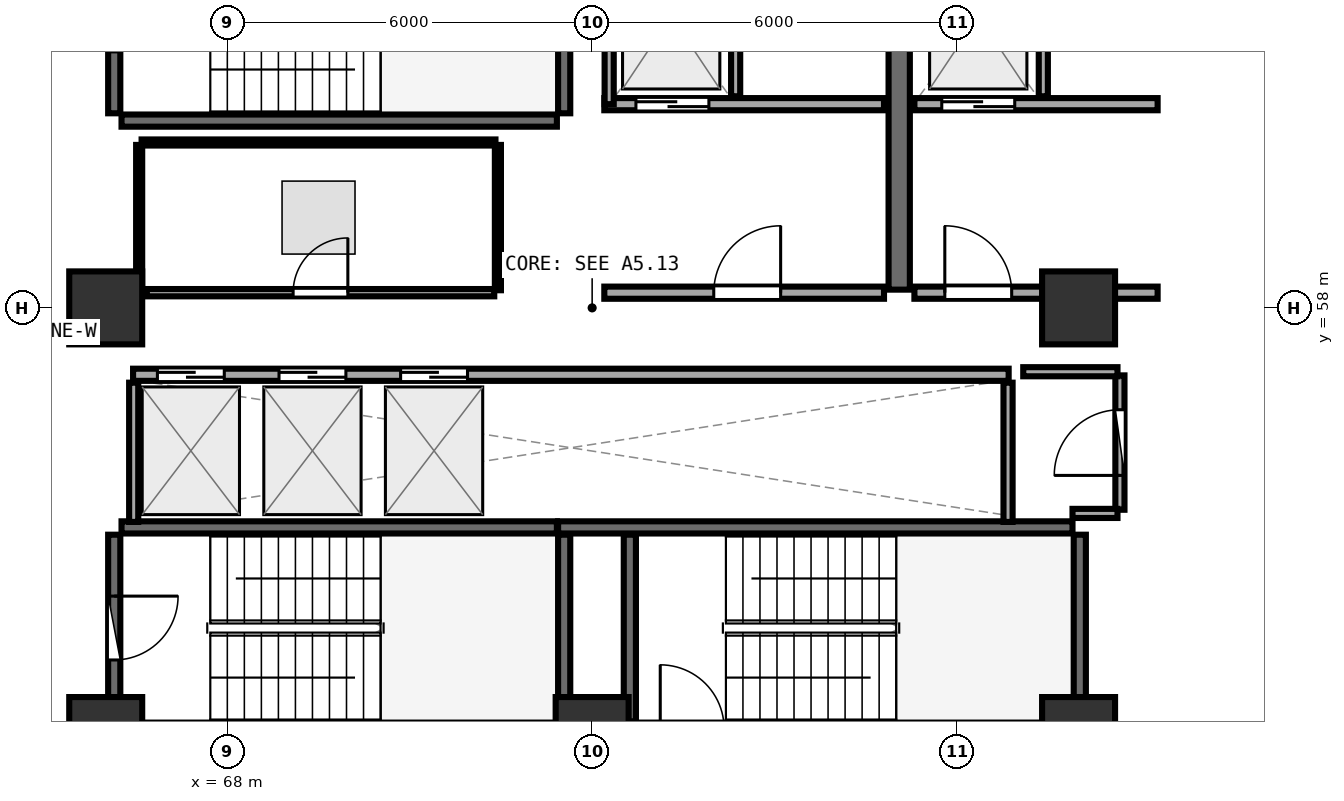
"""IFC4 building model, lengths in metres.
Left out: names, types, materials, properties, quantities, classifications, styles, units other than length and angle.
Written with IfcOpenShell. Run it as: python <this file> out.ifc"""

import sys

from ifc_helpers import new_model, si_unit, direction, frame, frame_2d, origin, origin_2d, place, context, subcontext, project, spatial, rectangle, extrude, element, fill, save


model = new_model("IFC4")
c1 = context("Model", 3, precision=1e-05, world=origin(), true_north=direction((0.0, 1.0)))
c2 = subcontext(c1, "Body", "Model", "MODEL_VIEW")
j1 = project(units=[si_unit("LENGTHUNIT", "METRE"), si_unit("PLANEANGLEUNIT", "RADIAN")], contexts=[c1])
p1 = place(None, origin())
s1 = spatial("IfcSite", under=j1, at=p1, CompositionType="ELEMENT")
p2 = place(p1, origin())
s2 = spatial("IfcBuilding", under=s1, at=p2, CompositionType="ELEMENT")
p3 = place(p2, frame((0.0, 0.0, 208.2)))
s3 = spatial("IfcBuildingStorey", under=s2, at=p3, CompositionType="ELEMENT", Elevation=208.2)
for number, where, z_axis, x_axis in (
    (1, (66.0, 51.0, 0.0), (0.0, 0.0, 1.0), (1.0, 0.0, 0.0)),
    (2, (74.0, 51.0, 0.0), (0.0, 0.0, 1.0), (1.0, 0.0, 0.0)),
    (3, (82.0, 51.0, 0.0), (0.0, 0.0, 1.0), (1.0, 0.0, 0.0)),
    (4, (82.0, 58.0, 0.0), (0.0, 0.0, 1.0), (1.0, 0.0, 0.0)),
    (5, (66.0, 58.0, 0.0), (0.0, 0.0, 1.0), (1.0, 0.0, 0.0)),
):
    element("IfcColumn", number, at=place(p3, frame(where, z_axis=z_axis, x_axis=x_axis)), inside=s3, PredefinedType="PILASTER", context=c2, shape_type="SweptSolid", body=[
        extrude(rectangle(XDim=1.2, YDim=1.2, at=origin_2d()), origin(), (0.0, 0.0, 1.0), 3.75),
    ])
p4 = place(p3, frame((66.26, 61.08, 0.0), z_axis=(0.0, 0.0, 1.0), x_axis=(1.0, 0.0, 0.0)))
e6 = element("IfcWall", 6, at=p4, inside=s3, PredefinedType="SHEAR", context=c2, shape_type="SweptSolid", body=[
    extrude(rectangle(XDim=7.16, YDim=0.2, at=frame_2d((3.58, 0.0))), origin(), (0.0, 0.0, 1.0), 3.49),
])
p5 = place(p3, frame((73.54, 61.2, 0.0), z_axis=(0.0, 0.0, 1.0), x_axis=(0.0, 1.0, 0.0)))
e7 = element("IfcWall", 7, at=p5, inside=s3, PredefinedType="SHEAR", context=c2, shape_type="SweptSolid", body=[
    extrude(rectangle(XDim=3.07, YDim=0.2, at=frame_2d((1.535, 0.0))), origin(), (0.0, 0.0, 1.0), 3.49),
])
p6 = place(p3, frame((66.14, 64.27, 0.0), z_axis=(0.0, 0.0, 1.0), x_axis=(0.0, -1.0, 0.0)))
e8 = element("IfcWall", 8, at=p6, inside=s3, PredefinedType="SHEAR", context=c2, shape_type="SweptSolid", body=[
    extrude(rectangle(XDim=3.07, YDim=0.2, at=frame_2d((1.535, 0.0))), origin(), (0.0, 0.0, 1.0), 3.49),
])
p7 = place(p6, frame((1.01, 0.0, 0.0)))
e9 = element("IfcOpeningElement", 9, at=p7, cuts=e8, PredefinedType="OPENING", context=c2, shape_type="SweptSolid", body=[
    extrude(rectangle(XDim=1.05, YDim=2.1, at=frame_2d((0.525, 1.05))), frame((0.0, 0.11, 0.0), z_axis=(0.0, -1.0, 0.0), x_axis=(1.0, 0.0, 0.0)), (0.0, 0.0, 1.0), 0.22),
])
p8 = place(p3, frame((82.02, 51.2, 0.0), z_axis=(0.0, 0.0, 1.0), x_axis=(0.0, 1.0, 0.0)))
e10 = element("IfcWall", 10, at=p8, inside=s3, PredefinedType="SHEAR", context=c2, shape_type="SweptSolid", body=[
    extrude(rectangle(XDim=3.07, YDim=0.2, at=frame_2d((1.535, 0.0))), origin(), (0.0, 0.0, 1.0), 3.49),
])
p9 = place(p3, frame((81.9, 54.39, 0.0), z_axis=(0.0, 0.0, 1.0), x_axis=(-1.0, 0.0, 0.0)))
e11 = element("IfcWall", 11, at=p9, inside=s3, PredefinedType="SHEAR", context=c2, shape_type="SweptSolid", body=[
    extrude(rectangle(XDim=8.46, YDim=0.2, at=frame_2d((4.23, 0.0))), origin(), (0.0, 0.0, 1.0), 3.49),
])
for number, where, z_axis, x_axis in (
    (12, (74.62, 54.27, 0.0), (0.0, 0.0, 1.0), (0.0, -1.0, 0.0)),
    (13, (73.54, 51.2, 0.0), (0.0, 0.0, 1.0), (0.0, 1.0, 0.0)),
):
    element("IfcWall", number, at=place(p3, frame(where, z_axis=z_axis, x_axis=x_axis)), inside=s3, PredefinedType="SHEAR", context=c2, shape_type="SweptSolid", body=[
        extrude(rectangle(XDim=3.07, YDim=0.2, at=frame_2d((1.535, 0.0))), origin(), (0.0, 0.0, 1.0), 3.49),
    ])
p10 = place(p3, frame((73.42, 54.39, 0.0), z_axis=(0.0, 0.0, 1.0), x_axis=(-1.0, 0.0, 0.0)))
e14 = element("IfcWall", 14, at=p10, inside=s3, PredefinedType="SHEAR", context=c2, shape_type="SweptSolid", body=[
    extrude(rectangle(XDim=7.16, YDim=0.2, at=frame_2d((3.58, 0.0))), origin(), (0.0, 0.0, 1.0), 3.49),
])
p11 = place(p3, frame((66.14, 54.27, 0.0), z_axis=(0.0, 0.0, 1.0), x_axis=(0.0, -1.0, 0.0)))
e15 = element("IfcWall", 15, at=p11, inside=s3, PredefinedType="SHEAR", context=c2, shape_type="SweptSolid", body=[
    extrude(rectangle(XDim=3.07, YDim=0.2, at=frame_2d((1.535, 0.0))), origin(), (0.0, 0.0, 1.0), 3.49),
])
p12 = place(p11, frame((1.01, 0.0, 0.0)))
e16 = element("IfcOpeningElement", 16, at=p12, cuts=e15, PredefinedType="OPENING", context=c2, shape_type="SweptSolid", body=[
    extrude(rectangle(XDim=1.05, YDim=2.1, at=frame_2d((0.525, 1.05))), frame((0.0, 0.11, 0.0), z_axis=(0.0, -1.0, 0.0), x_axis=(1.0, 0.0, 0.0)), (0.0, 0.0, 1.0), 0.22),
])
p13 = place(p3, frame((79.05, 58.3, 0.0), z_axis=(0.0, 0.0, 1.0), x_axis=(0.0, 1.0, 0.0)))
e17 = element("IfcWall", 17, at=p13, inside=s3, PredefinedType="SHEAR", context=c2, shape_type="SweptSolid", body=[
    extrude(rectangle(XDim=6.3, YDim=0.35, at=frame_2d((3.15, 0.0))), origin(), (0.0, 0.0, 1.0), 3.49),
])
p14 = place(p3, frame((74.2, 61.35, 0.0), z_axis=(0.0, 0.0, 1.0), x_axis=(1.0, 0.0, 0.0)))
e18 = element("IfcWall", 18, at=p14, inside=s3, PredefinedType="SOLIDWALL", context=c2, shape_type="SweptSolid", body=[
    extrude(rectangle(XDim=4.6, YDim=0.2, at=frame_2d((2.3, 0.0))), origin(), (0.0, 0.0, 1.0), 3.48),
])
p15 = place(p14, frame((0.52, 0.0, 0.0)))
e19 = element("IfcOpeningElement", 19, at=p15, cuts=e18, PredefinedType="OPENING", context=c2, shape_type="SweptSolid", body=[
    extrude(rectangle(XDim=1.2, YDim=2.15, at=frame_2d((0.6, 1.075))), frame((0.0, 0.11, 0.0), z_axis=(0.0, -1.0, 0.0), x_axis=(1.0, 0.0, 0.0)), (0.0, 0.0, 1.0), 0.22),
])
p16 = place(p3, frame((74.28, 61.35, 0.0), z_axis=(0.0, 0.0, 1.0), x_axis=(0.0, 1.0, 0.0)))
e20 = element("IfcWall", 20, at=p16, inside=s3, PredefinedType="PARTITIONING", context=c2, shape_type="SweptSolid", body=[
    extrude(rectangle(XDim=2.97, YDim=0.15, at=frame_2d((1.485, 0.0))), origin(), (0.0, 0.0, 1.0), 3.48),
])
p17 = place(p3, frame((76.36, 61.48, 0.0), z_axis=(0.0, 0.0, 1.0), x_axis=(0.0, 1.0, 0.0)))
e21 = element("IfcWall", 21, at=p17, inside=s3, PredefinedType="PARTITIONING", context=c2, shape_type="SweptSolid", body=[
    extrude(rectangle(XDim=2.84, YDim=0.15, at=frame_2d((1.42, 0.0))), origin(), (0.0, 0.0, 1.0), 3.48),
])
p18 = place(p3, frame((79.3, 61.35, 0.0), z_axis=(0.0, 0.0, 1.0), x_axis=(1.0, 0.0, 0.0)))
e22 = element("IfcWall", 22, at=p18, inside=s3, PredefinedType="SOLIDWALL", context=c2, shape_type="SweptSolid", body=[
    extrude(rectangle(XDim=4.0, YDim=0.2, at=frame_2d((2.0, 0.0))), origin(), (0.0, 0.0, 1.0), 2.775),
])
p19 = place(p18, frame((0.45, 0.0, 0.0)))
e23 = element("IfcOpeningElement", 23, at=p19, cuts=e22, PredefinedType="OPENING", context=c2, shape_type="SweptSolid", body=[
    extrude(rectangle(XDim=1.2, YDim=2.15, at=frame_2d((0.6, 1.075))), frame((0.0, 0.11, 0.0), z_axis=(0.0, -1.0, 0.0), x_axis=(1.0, 0.0, 0.0)), (0.0, 0.0, 1.0), 0.22),
])
p20 = place(p3, frame((81.42, 61.48, 0.0), z_axis=(0.0, 0.0, 1.0), x_axis=(0.0, 1.0, 0.0)))
e24 = element("IfcWall", 24, at=p20, inside=s3, PredefinedType="PARTITIONING", context=c2, shape_type="SweptSolid", body=[
    extrude(rectangle(XDim=2.84, YDim=0.15, at=frame_2d((1.42, 0.0))), origin(), (0.0, 0.0, 1.0), 3.48),
])
p21 = place(p3, frame((74.2, 58.25, 0.0), z_axis=(0.0, 0.0, 1.0), x_axis=(1.0, 0.0, 0.0)))
e25 = element("IfcWall", 25, at=p21, inside=s3, PredefinedType="SOLIDWALL", context=c2, shape_type="SweptSolid", body=[
    extrude(rectangle(XDim=4.6, YDim=0.2, at=frame_2d((2.3, 0.0))), origin(), (0.0, 0.0, 1.0), 3.48),
])
p22 = place(p21, frame((1.8, 0.0, 0.0)))
e26 = element("IfcOpeningElement", 26, at=p22, cuts=e25, PredefinedType="OPENING", context=c2, shape_type="SweptSolid", body=[
    extrude(rectangle(XDim=1.1, YDim=2.1, at=frame_2d((0.55, 1.05))), frame((0.0, 0.11, 0.0), z_axis=(0.0, -1.0, 0.0), x_axis=(1.0, 0.0, 0.0)), (0.0, 0.0, 1.0), 0.22),
])
p23 = place(p3, frame((79.3, 58.25, 0.0), z_axis=(0.0, 0.0, 1.0), x_axis=(1.0, 0.0, 0.0)))
e27 = element("IfcWall", 27, at=p23, inside=s3, PredefinedType="SOLIDWALL", context=c2, shape_type="SweptSolid", body=[
    extrude(rectangle(XDim=4.0, YDim=0.2, at=frame_2d((2.0, 0.0))), origin(), (0.0, 0.0, 1.0), 2.775),
])
p24 = place(p23, frame((0.5, 0.0, 0.0)))
e28 = element("IfcOpeningElement", 28, at=p24, cuts=e27, PredefinedType="OPENING", context=c2, shape_type="SweptSolid", body=[
    extrude(rectangle(XDim=1.1, YDim=2.1, at=frame_2d((0.55, 1.05))), frame((0.0, 0.11, 0.0), z_axis=(0.0, -1.0, 0.0), x_axis=(1.0, 0.0, 0.0)), (0.0, 0.0, 1.0), 0.22),
])
p25 = place(p3, frame((66.45, 56.9, 0.0), z_axis=(0.0, 0.0, 1.0), x_axis=(1.0, 0.0, 0.0)))
e29 = element("IfcWall", 29, at=p25, inside=s3, PredefinedType="SOLIDWALL", context=c2, shape_type="SweptSolid", body=[
    extrude(rectangle(XDim=14.4, YDim=0.2, at=frame_2d((7.2, 0.0))), origin(), (0.0, 0.0, 1.0), 3.48),
])
p26 = place(p25, frame((0.4, 0.0, 0.0)))
e30 = element("IfcOpeningElement", 30, at=p26, cuts=e29, PredefinedType="OPENING", context=c2, shape_type="SweptSolid", body=[
    extrude(rectangle(XDim=1.1, YDim=2.1, at=frame_2d((0.55, 1.05))), frame((0.0, 0.11, 0.0), z_axis=(0.0, -1.0, 0.0), x_axis=(1.0, 0.0, 0.0)), (0.0, 0.0, 1.0), 0.22),
])
p27 = place(p25, frame((2.4, 0.0, 0.0)))
e31 = element("IfcOpeningElement", 31, at=p27, cuts=e29, PredefinedType="OPENING", context=c2, shape_type="SweptSolid", body=[
    extrude(rectangle(XDim=1.1, YDim=2.1, at=frame_2d((0.55, 1.05))), frame((0.0, 0.11, 0.0), z_axis=(0.0, -1.0, 0.0), x_axis=(1.0, 0.0, 0.0)), (0.0, 0.0, 1.0), 0.22),
])
p28 = place(p25, frame((4.4, 0.0, 0.0)))
e32 = element("IfcOpeningElement", 32, at=p28, cuts=e29, PredefinedType="OPENING", context=c2, shape_type="SweptSolid", body=[
    extrude(rectangle(XDim=1.1, YDim=2.1, at=frame_2d((0.55, 1.05))), frame((0.0, 0.11, 0.0), z_axis=(0.0, -1.0, 0.0), x_axis=(1.0, 0.0, 0.0)), (0.0, 0.0, 1.0), 0.22),
])
for number, where, z_axis, x_axis in (
    (33, (66.46, 54.48, 0.0), (0.0, 0.0, 1.0), (0.0, 1.0, 0.0)),
    (34, (80.84, 54.48, 0.0), (0.0, 0.0, 1.0), (0.0, 1.0, 0.0)),
):
    element("IfcWall", number, at=place(p3, frame(where, z_axis=z_axis, x_axis=x_axis)), inside=s3, PredefinedType="PARTITIONING", context=c2, shape_type="SweptSolid", body=[
        extrude(rectangle(XDim=2.29, YDim=0.15, at=frame_2d((1.145, 0.0))), origin(), (0.0, 0.0, 1.0), 3.48),
    ])
p29 = place(p3, frame((82.68, 54.68, 0.0), z_axis=(0.0, 0.0, 1.0), x_axis=(0.0, 1.0, 0.0)))
e35 = element("IfcWall", 35, at=p29, inside=s3, PredefinedType="PARTITIONING", context=c2, shape_type="SweptSolid", body=[
    extrude(rectangle(XDim=2.21, YDim=0.15, at=frame_2d((1.105, 0.0))), origin(), (0.0, 0.0, 1.0), 3.48),
])
p30 = place(p29, frame((0.565, 0.0, 0.0)))
e36 = element("IfcOpeningElement", 36, at=p30, cuts=e35, PredefinedType="OPENING", context=c2, shape_type="SweptSolid", body=[
    extrude(rectangle(XDim=1.08, YDim=2.1, at=frame_2d((0.54, 1.05))), frame((0.0, 0.085, 0.0), z_axis=(0.0, -1.0, 0.0), x_axis=(1.0, 0.0, 0.0)), (0.0, 0.0, 1.0), 0.17),
])
p31 = place(p3, frame((66.675, 58.25, 0.0), z_axis=(0.0, 0.0, 1.0), x_axis=(1.0, 0.0, 0.0)))
e37 = element("IfcWall", 37, at=p31, inside=s3, PredefinedType="PARTITIONING", context=c2, shape_type="SweptSolid", body=[
    extrude(rectangle(XDim=5.715, YDim=0.12, at=frame_2d((2.857, 0.0))), origin(), (0.0, 0.0, 1.0), 3.48),
])
p32 = place(p31, frame((2.407, 0.0, 0.0)))
e38 = element("IfcOpeningElement", 38, at=p32, cuts=e37, PredefinedType="OPENING", context=c2, shape_type="SweptSolid", body=[
    extrude(rectangle(XDim=0.9, YDim=2.08, at=frame_2d((0.45, 1.04))), frame((0.0, 0.07, 0.0), z_axis=(0.0, -1.0, 0.0), x_axis=(1.0, 0.0, 0.0)), (0.0, 0.0, 1.0), 0.14),
])
p33 = place(p3, frame((81.9, 54.62, 0.0), z_axis=(0.0, 0.0, 1.0), x_axis=(1.0, 0.0, 0.0)))
e39 = element("IfcWall", 39, at=p33, inside=s3, PredefinedType="PARTITIONING", context=c2, shape_type="SweptSolid", body=[
    extrude(rectangle(XDim=0.74, YDim=0.15, at=frame_2d((0.37, 0.0))), origin(), (0.0, 0.0, 1.0), 2.775),
])
p34 = place(p3, frame((82.64, 56.95, 0.0), z_axis=(0.0, 0.0, 1.0), x_axis=(-1.0, 0.0, 0.0)))
e40 = element("IfcWall", 40, at=p34, inside=s3, PredefinedType="PARTITIONING", context=c2, shape_type="SweptSolid", body=[
    extrude(rectangle(XDim=1.55, YDim=0.15, at=frame_2d((0.775, 0.0))), origin(), (0.0, 0.0, 1.0), 2.775),
])
p35 = place(p3, frame((72.45, 58.29, 0.0), z_axis=(0.0, 0.0, 1.0), x_axis=(0.0, 1.0, 0.0)))
e41 = element("IfcWall", 41, at=p35, inside=s3, PredefinedType="PARTITIONING", context=c2, shape_type="SweptSolid", body=[
    extrude(rectangle(XDim=2.39, YDim=0.1, at=frame_2d((1.195, 0.0))), origin(), (0.0, 0.0, 1.0), 3.48),
])
p36 = place(p3, frame((72.41, 60.72, 0.0), z_axis=(0.0, 0.0, 1.0), x_axis=(-1.0, 0.0, 0.0)))
e42 = element("IfcWall", 42, at=p36, inside=s3, PredefinedType="PARTITIONING", context=c2, shape_type="SweptSolid", body=[
    extrude(rectangle(XDim=5.82, YDim=0.1, at=frame_2d((2.91, 0.0))), origin(), (0.0, 0.0, 1.0), 3.48),
])
p37 = place(p3, frame((66.55, 60.68, 0.0), z_axis=(0.0, 0.0, 1.0), x_axis=(0.0, -1.0, 0.0)))
e43 = element("IfcWall", 43, at=p37, inside=s3, PredefinedType="PARTITIONING", context=c2, shape_type="SweptSolid", body=[
    extrude(rectangle(XDim=2.383, YDim=0.1, at=frame_2d((1.191, 0.0))), origin(), (0.0, 0.0, 1.0), 3.48),
])
p38 = place(p3, frame((82.588, 48.389, 0.0), z_axis=(0.0, 0.0, 1.0), x_axis=(0.68157475052, 0.731748494671, 0.0)))
e44 = element("IfcWall", 44, at=p38, inside=s3, PredefinedType="PARTITIONING", context=c2, shape_type="SweptSolid", body=[
    extrude(rectangle(XDim=5.08, YDim=0.1, at=frame_2d((2.54, 0.0))), origin(), (0.0, 0.0, 1.0), 3.025),
])
p39 = place(p3, frame((87.468, 60.334, 0.0), z_axis=(0.0, 0.0, 1.0), x_axis=(-0.534944175276, 0.844887406308, 0.0)))
e45 = element("IfcWall", 45, at=p39, inside=s3, PredefinedType="PARTITIONING", context=c2, shape_type="SweptSolid", body=[
    extrude(rectangle(XDim=8.128, YDim=0.1, at=frame_2d((4.064, 0.0))), origin(), (0.0, 0.0, 1.0), 3.025),
])
p40 = place(p12, origin())
e46 = element("IfcDoor", 46, at=p40, inside=s3, OperationType="SINGLE_SWING_LEFT", PredefinedType="DOOR", context=c2, shape_type="SweptSolid", body=[
    extrude(rectangle(XDim=1.05, YDim=2.1, at=frame_2d((0.525, 1.05))), frame((0.0, 0.025, 0.0), z_axis=(0.0, -1.0, 0.0), x_axis=(1.0, 0.0, 0.0)), (0.0, 0.0, 1.0), 0.05),
])
fill(e16, e46)
p41 = place(p15, origin())
e47 = element("IfcDoor", 47, at=p41, inside=s3, OperationType="DOUBLE_DOOR_SLIDING", PredefinedType="DOOR", context=c2, shape_type="SweptSolid", body=[
    extrude(rectangle(XDim=1.2, YDim=2.15, at=frame_2d((0.6, 1.075))), frame((0.0, 0.025, 0.0), z_axis=(0.0, -1.0, 0.0), x_axis=(1.0, 0.0, 0.0)), (0.0, 0.0, 1.0), 0.05),
])
fill(e19, e47)
p42 = place(p19, origin())
e48 = element("IfcDoor", 48, at=p42, inside=s3, OperationType="DOUBLE_DOOR_SLIDING", PredefinedType="DOOR", context=c2, shape_type="SweptSolid", body=[
    extrude(rectangle(XDim=1.2, YDim=2.15, at=frame_2d((0.6, 1.075))), frame((0.0, 0.025, 0.0), z_axis=(0.0, -1.0, 0.0), x_axis=(1.0, 0.0, 0.0)), (0.0, 0.0, 1.0), 0.05),
])
fill(e23, e48)
p43 = place(p22, frame((1.1, 0.0, 0.0), z_axis=(0.0, 0.0, 1.0), x_axis=(-1.0, 0.0, 0.0)))
e49 = element("IfcDoor", 49, at=p43, inside=s3, OperationType="SINGLE_SWING_LEFT", PredefinedType="DOOR", context=c2, shape_type="SweptSolid", body=[
    extrude(rectangle(XDim=1.1, YDim=2.1, at=frame_2d((0.55, 1.05))), frame((0.0, 0.025, 0.0), z_axis=(0.0, -1.0, 0.0), x_axis=(1.0, 0.0, 0.0)), (0.0, 0.0, 1.0), 0.05),
])
fill(e26, e49)
p44 = place(p24, frame((1.1, 0.0, 0.0), z_axis=(0.0, 0.0, 1.0), x_axis=(-1.0, 0.0, 0.0)))
e50 = element("IfcDoor", 50, at=p44, inside=s3, OperationType="SINGLE_SWING_RIGHT", PredefinedType="DOOR", context=c2, shape_type="SweptSolid", body=[
    extrude(rectangle(XDim=1.1, YDim=2.1, at=frame_2d((0.55, 1.05))), frame((0.0, 0.025, 0.0), z_axis=(0.0, -1.0, 0.0), x_axis=(1.0, 0.0, 0.0)), (0.0, 0.0, 1.0), 0.05),
])
fill(e28, e50)
p45 = place(p26, origin())
e51 = element("IfcDoor", 51, at=p45, inside=s3, OperationType="DOUBLE_DOOR_SLIDING", PredefinedType="DOOR", context=c2, shape_type="SweptSolid", body=[
    extrude(rectangle(XDim=1.1, YDim=2.1, at=frame_2d((0.55, 1.05))), frame((0.0, 0.025, 0.0), z_axis=(0.0, -1.0, 0.0), x_axis=(1.0, 0.0, 0.0)), (0.0, 0.0, 1.0), 0.05),
])
fill(e30, e51)
p46 = place(p27, origin())
e52 = element("IfcDoor", 52, at=p46, inside=s3, OperationType="DOUBLE_DOOR_SLIDING", PredefinedType="DOOR", context=c2, shape_type="SweptSolid", body=[
    extrude(rectangle(XDim=1.1, YDim=2.1, at=frame_2d((0.55, 1.05))), frame((0.0, 0.025, 0.0), z_axis=(0.0, -1.0, 0.0), x_axis=(1.0, 0.0, 0.0)), (0.0, 0.0, 1.0), 0.05),
])
fill(e31, e52)
p47 = place(p28, origin())
e53 = element("IfcDoor", 53, at=p47, inside=s3, OperationType="DOUBLE_DOOR_SLIDING", PredefinedType="DOOR", context=c2, shape_type="SweptSolid", body=[
    extrude(rectangle(XDim=1.1, YDim=2.1, at=frame_2d((0.55, 1.05))), frame((0.0, 0.025, 0.0), z_axis=(0.0, -1.0, 0.0), x_axis=(1.0, 0.0, 0.0)), (0.0, 0.0, 1.0), 0.05),
])
fill(e32, e53)
p48 = place(p30, origin())
e54 = element("IfcDoor", 54, at=p48, inside=s3, OperationType="SINGLE_SWING_LEFT", PredefinedType="DOOR", context=c2, shape_type="SweptSolid", body=[
    extrude(rectangle(XDim=1.08, YDim=2.1, at=frame_2d((0.54, 1.05))), frame((0.0, 0.025, 0.0), z_axis=(0.0, -1.0, 0.0), x_axis=(1.0, 0.0, 0.0)), (0.0, 0.0, 1.0), 0.05),
])
fill(e36, e54)
p49 = place(p32, origin())
e55 = element("IfcDoor", 55, at=p49, inside=s3, OperationType="SINGLE_SWING_RIGHT", PredefinedType="DOOR", context=c2, shape_type="SweptSolid", body=[
    extrude(rectangle(XDim=0.9, YDim=2.08, at=frame_2d((0.45, 1.04))), frame((0.0, 0.025, 0.0), z_axis=(0.0, -1.0, 0.0), x_axis=(1.0, 0.0, 0.0)), (0.0, 0.0, 1.0), 0.05),
])
fill(e38, e55)
save(model, sys.argv[1])
